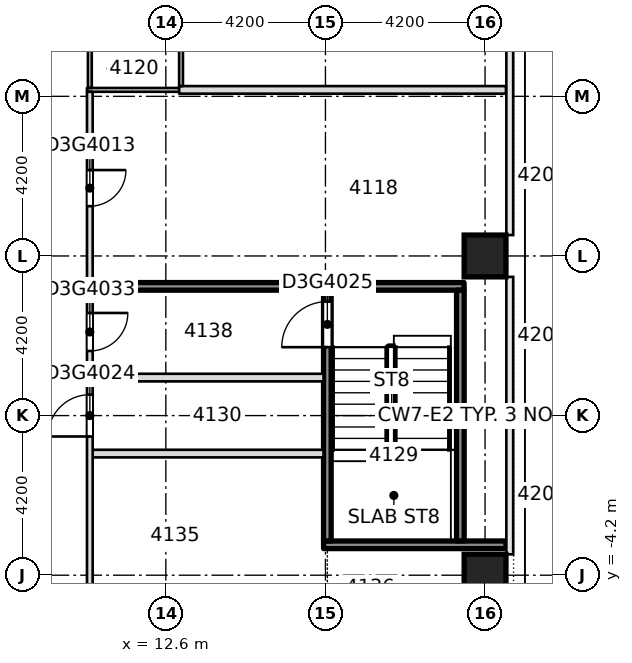
"""IFC4 building model, lengths in metres.
Left out: names, types, materials, properties, quantities, classifications, styles, units other than length and angle.
Written with IfcOpenShell. Run it as: python <this file> out.ifc"""

import sys

from ifc_helpers import new_model, si_unit, direction, frame, frame_2d, origin, origin_2d, place, context, subcontext, project, spatial, rectangle, extrude, element, fill, save


model = new_model("IFC4")
c1 = context("Model", 3, precision=1e-05, world=origin(), true_north=direction((0.0, 1.0)))
c2 = subcontext(c1, "Body", "Model", "MODEL_VIEW")
j1 = project(units=[si_unit("LENGTHUNIT", "METRE"), si_unit("PLANEANGLEUNIT", "RADIAN")], contexts=[c1])
p1 = place(None, origin())
s1 = spatial("IfcSite", under=j1, at=p1, CompositionType="ELEMENT")
p2 = place(p1, origin())
s2 = spatial("IfcBuilding", under=s1, at=p2, CompositionType="ELEMENT")
p3 = place(p2, frame((0.0, 0.0, 160.7)))
s3 = spatial("IfcBuildingStorey", under=s2, at=p3, CompositionType="ELEMENT", Elevation=160.7)
for number, where, z_axis, x_axis in (
    (1, (21.0, -4.2, -0.4), (0.0, 0.0, 1.0), (1.0, 0.0, 0.0)),
    (2, (21.0, 4.2, -0.4), (0.0, 0.0, 1.0), (1.0, 0.0, 0.0)),
):
    element("IfcColumn", number, at=place(p3, frame(where, z_axis=z_axis, x_axis=x_axis)), inside=s3, PredefinedType="COLUMN", context=c2, shape_type="SweptSolid", body=[
        extrude(rectangle(XDim=1.1, YDim=1.1, at=origin_2d()), origin(), (0.0, 0.0, 1.0), 3.45),
    ])
p4 = place(p3, frame((16.751, -3.4, 0.0), z_axis=(0.0, 0.0, 1.0), x_axis=(1.0, 0.0, 0.0)))
e3 = element("IfcWall", 3, at=p4, inside=s3, PredefinedType="SOLIDWALL", context=c2, shape_type="SweptSolid", body=[
    extrude(rectangle(XDim=4.799, YDim=0.2, at=frame_2d((2.399, 0.0))), origin(), (0.0, 0.0, 1.0), 3.05),
])
for number, where, z_axis, x_axis in (
    (4, (10.675, -1.0, 0.0), (0.0, 0.0, 1.0), (1.0, 0.0, 0.0)),
    (5, (10.675, 1.0, 0.0), (0.0, 0.0, 1.0), (1.0, 0.0, 0.0)),
):
    element("IfcWall", number, at=place(p3, frame(where, z_axis=z_axis, x_axis=x_axis)), inside=s3, PredefinedType="PARTITIONING", context=c2, shape_type="SweptSolid", body=[
        extrude(rectangle(XDim=6.075, YDim=0.2, at=frame_2d((3.038, 0.0))), origin(), (0.0, 0.0, 1.0), 3.05),
    ])
p5 = place(p3, frame((10.675, 3.4, 0.0), z_axis=(0.0, 0.0, 1.0), x_axis=(1.0, 0.0, 0.0)))
e6 = element("IfcWall", 6, at=p5, inside=s3, PredefinedType="SOLIDWALL", context=c2, shape_type="SweptSolid", body=[
    extrude(rectangle(XDim=9.773, YDim=0.2, at=frame_2d((4.886, 0.0))), origin(), (0.0, 0.0, 1.0), 3.05),
])
p6 = place(p3, frame((10.525, 8.57, 0.0), z_axis=(0.0, 0.0, 1.0), x_axis=(1.0, 0.0, 0.0)))
e7 = element("IfcWall", 7, at=p6, inside=s3, PredefinedType="PARTITIONING", context=c2, shape_type="SweptSolid", body=[
    extrude(rectangle(XDim=2.525, YDim=0.1, at=frame_2d((1.263, 0.0))), origin(), (0.0, 0.0, 1.0), 3.05),
])
p7 = place(p3, frame((12.95, 8.57, 0.0), z_axis=(0.0, 0.0, 1.0), x_axis=(1.0, 0.0, 0.0)))
e8 = element("IfcWall", 8, at=p7, inside=s3, PredefinedType="PARTITIONING", context=c2, shape_type="SweptSolid", body=[
    extrude(rectangle(XDim=8.6, YDim=0.2, at=frame_2d((4.3, 0.0))), origin(), (0.0, 0.0, 1.0), 3.05),
])
p8 = place(p3, frame((10.6, -6.225, 0.0), z_axis=(0.0, 0.0, 1.0), x_axis=(0.0, 1.0, 0.0)))
e9 = element("IfcWall", 9, at=p8, inside=s3, PredefinedType="PARTITIONING", context=c2, shape_type="SweptSolid", body=[
    extrude(rectangle(XDim=14.745, YDim=0.15, at=frame_2d((7.373, 0.0))), origin(), (0.0, 0.0, 1.0), 3.05),
])
p9 = place(p8, frame((11.735, 0.0, 0.0)))
e10 = element("IfcOpeningElement", 10, at=p9, cuts=e9, PredefinedType="OPENING", context=c2, shape_type="SweptSolid", body=[
    extrude(rectangle(XDim=0.95, YDim=2.1, at=frame_2d((0.475, 1.05))), frame((0.0, 0.085, 0.0), z_axis=(0.0, -1.0, 0.0), x_axis=(1.0, 0.0, 0.0)), (0.0, 0.0, 1.0), 0.17),
])
p10 = place(p8, frame((5.675, 0.0, 0.0)))
e11 = element("IfcOpeningElement", 11, at=p10, cuts=e9, PredefinedType="OPENING", context=c2, shape_type="SweptSolid", body=[
    extrude(rectangle(XDim=1.1, YDim=2.1, at=frame_2d((0.55, 1.05))), frame((0.0, 0.085, 0.0), z_axis=(0.0, -1.0, 0.0), x_axis=(1.0, 0.0, 0.0)), (0.0, 0.0, 1.0), 0.17),
])
p11 = place(p8, frame((7.925, 0.0, 0.0)))
e12 = element("IfcOpeningElement", 12, at=p11, cuts=e9, PredefinedType="OPENING", context=c2, shape_type="SweptSolid", body=[
    extrude(rectangle(XDim=1.0, YDim=2.1, at=frame_2d((0.5, 1.05))), frame((0.0, 0.085, 0.0), z_axis=(0.0, -1.0, 0.0), x_axis=(1.0, 0.0, 0.0)), (0.0, 0.0, 1.0), 0.17),
])
p12 = place(p3, frame((10.6, 8.62, 0.0), z_axis=(0.0, 0.0, 1.0), x_axis=(0.0, 1.0, 0.0)))
e13 = element("IfcWall", 13, at=p12, inside=s3, PredefinedType="PARTITIONING", context=c2, shape_type="SweptSolid", body=[
    extrude(rectangle(XDim=2.0, YDim=0.1, at=frame_2d((1.0, 0.0))), origin(), (0.0, 0.0, 1.0), 3.05),
])
p13 = place(p3, frame((13.0, 8.67, 0.0), z_axis=(0.0, 0.0, 1.0), x_axis=(0.0, 1.0, 0.0)))
e14 = element("IfcWall", 14, at=p13, inside=s3, PredefinedType="PARTITIONING", context=c2, shape_type="SweptSolid", body=[
    extrude(rectangle(XDim=1.95, YDim=0.1, at=frame_2d((0.975, 0.0))), origin(), (0.0, 0.0, 1.0), 3.05),
])
p14 = place(p3, frame((16.85, -3.3, 0.0), z_axis=(0.0, 0.0, 1.0), x_axis=(0.0, 1.0, 0.0)))
e15 = element("IfcWall", 15, at=p14, inside=s3, PredefinedType="SOLIDWALL", context=c2, shape_type="SweptSolid", body=[
    extrude(rectangle(XDim=6.6, YDim=0.2, at=frame_2d((3.3, 0.0))), origin(), (0.0, 0.0, 1.0), 3.05),
])
p15 = place(p14, frame((5.1, 0.0, 0.0)))
e16 = element("IfcOpeningElement", 16, at=p15, cuts=e15, PredefinedType="OPENING", context=c2, shape_type="SweptSolid", body=[
    extrude(rectangle(XDim=1.2, YDim=2.1, at=frame_2d((0.6, 1.05))), frame((0.0, 0.11, 0.0), z_axis=(0.0, -1.0, 0.0), x_axis=(1.0, 0.0, 0.0)), (0.0, 0.0, 1.0), 0.22),
])
p16 = place(p3, frame((20.35, -3.298, 0.0), z_axis=(0.0, 0.0, 1.0), x_axis=(0.0, 1.0, 0.0)))
e17 = element("IfcWall", 17, at=p16, inside=s3, PredefinedType="SOLIDWALL", context=c2, shape_type="SweptSolid", body=[
    extrude(rectangle(XDim=6.596, YDim=0.2, at=frame_2d((3.298, 0.0))), origin(), (0.0, 0.0, 1.0), 3.05),
])
p17 = place(p9, origin())
e18 = element("IfcDoor", 18, at=p17, inside=s3, OperationType="SINGLE_SWING_LEFT", PredefinedType="DOOR", context=c2, shape_type="SweptSolid", body=[
    extrude(rectangle(XDim=0.95, YDim=2.1, at=frame_2d((0.475, 1.05))), frame((0.0, 0.025, 0.0), z_axis=(0.0, -1.0, 0.0), x_axis=(1.0, 0.0, 0.0)), (0.0, 0.0, 1.0), 0.05),
])
fill(e10, e18)
p18 = place(p10, origin())
e19 = element("IfcDoor", 19, at=p18, inside=s3, OperationType="SINGLE_SWING_LEFT", PredefinedType="DOOR", context=c2, shape_type="SweptSolid", body=[
    extrude(rectangle(XDim=1.1, YDim=2.1, at=frame_2d((0.55, 1.05))), frame((0.0, 0.025, 0.0), z_axis=(0.0, -1.0, 0.0), x_axis=(1.0, 0.0, 0.0)), (0.0, 0.0, 1.0), 0.05),
])
fill(e11, e19)
p19 = place(p15, origin())
e20 = element("IfcDoor", 20, at=p19, inside=s3, OperationType="SINGLE_SWING_LEFT", PredefinedType="DOOR", context=c2, shape_type="SweptSolid", body=[
    extrude(rectangle(XDim=1.2, YDim=2.1, at=frame_2d((0.6, 1.05))), frame((0.0, 0.025, 0.0), z_axis=(0.0, -1.0, 0.0), x_axis=(1.0, 0.0, 0.0)), (0.0, 0.0, 1.0), 0.05),
])
fill(e16, e20)
p20 = place(p11, origin())
e21 = element("IfcDoor", 21, at=p20, inside=s3, OperationType="SINGLE_SWING_RIGHT", PredefinedType="DOOR", context=c2, shape_type="SweptSolid", body=[
    extrude(rectangle(XDim=1.0, YDim=2.1, at=frame_2d((0.5, 1.05))), frame((0.0, 0.025, 0.0), z_axis=(0.0, -1.0, 0.0), x_axis=(1.0, 0.0, 0.0)), (0.0, 0.0, 1.0), 0.05),
])
fill(e12, e21)
save(model, sys.argv[1])
